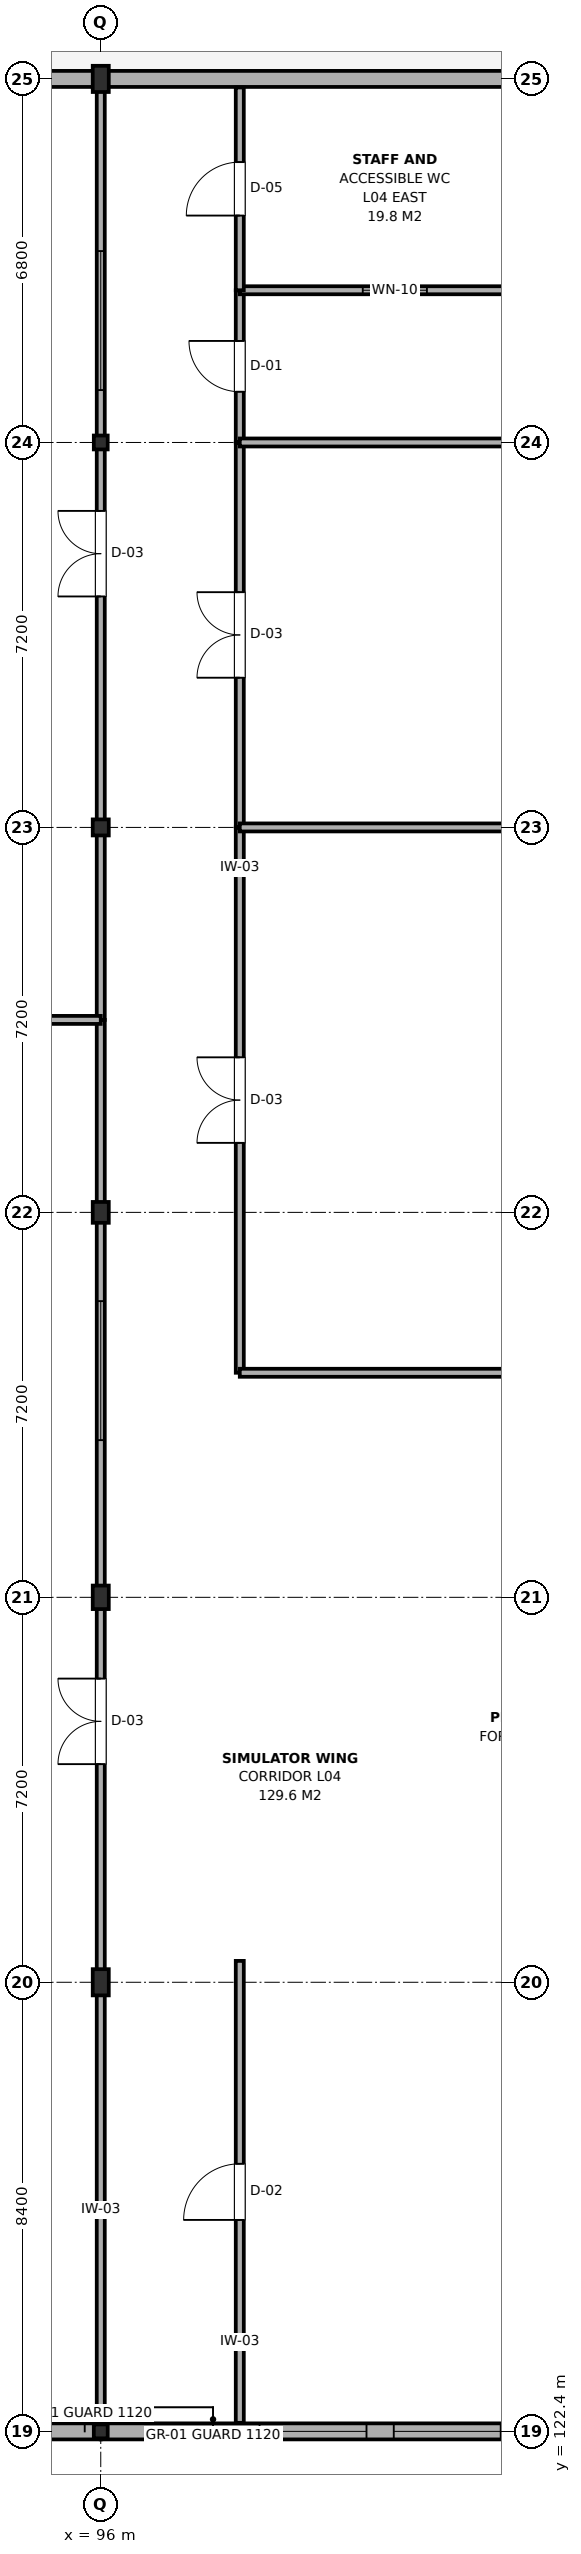
"""IFC4 building model, lengths in metres.
Left out: names, types, materials, properties, quantities, classifications, styles, units other than length and angle.
Written with IfcOpenShell. Run it as: python <this file> out.ifc"""

import sys

from ifc_helpers import new_model, si_unit, direction, frame, frame_2d, origin, origin_2d, place, context, subcontext, project, spatial, rectangle, i_section, extrude, element, fill, save


model = new_model("IFC4")
c1 = context("Model", 3, precision=1e-05, world=origin(), true_north=direction((0.0, 1.0)))
c2 = subcontext(c1, "Body", "Model", "MODEL_VIEW")
j1 = project(units=[si_unit("LENGTHUNIT", "METRE"), si_unit("PLANEANGLEUNIT", "RADIAN")], contexts=[c1])
p1 = place(None, origin())
s1 = spatial("IfcSite", under=j1, at=p1, CompositionType="ELEMENT")
p2 = place(p1, origin())
s2 = spatial("IfcBuilding", under=s1, at=p2, CompositionType="ELEMENT")
p3 = place(p2, frame((0.0, 0.0, 17.1)))
s3 = spatial("IfcBuildingStorey", under=s2, at=p3, CompositionType="ELEMENT", Elevation=17.1)
p4 = place(p3, frame((96.0, 122.4, 0.0), z_axis=(0.0, 0.0, 1.0), x_axis=(1.0, 0.0, 0.0)))
e1 = element("IfcColumn", 1, at=p4, inside=s3, PredefinedType="COLUMN", context=c2, shape_type="SweptSolid", body=[
    extrude(i_section(OverallWidth=0.26, OverallDepth=0.26, WebThickness=0.01, FlangeThickness=0.018, FilletRadius=0.024, at=origin_2d()), origin(), (0.0, 0.0, 1.0), 3.9),
])
p5 = place(p3, frame((96.0, 130.8, 0.0), z_axis=(0.0, 0.0, 1.0), x_axis=(1.0, 0.0, 0.0)))
e2 = element("IfcColumn", 2, at=p5, inside=s3, PredefinedType="COLUMN", context=c2, shape_type="SweptSolid", body=[
    extrude(i_section(OverallWidth=0.3, OverallDepth=0.49, WebThickness=0.012, FlangeThickness=0.023, FilletRadius=0.027, at=origin_2d()), origin(), (0.0, 0.0, 1.0), 3.9),
])
p6 = place(p3, frame((96.0, 138.0, 0.0), z_axis=(0.0, 0.0, 1.0), x_axis=(1.0, 0.0, 0.0)))
e3 = element("IfcColumn", 3, at=p6, inside=s3, PredefinedType="COLUMN", context=c2, shape_type="SweptSolid", body=[
    extrude(i_section(OverallWidth=0.3, OverallDepth=0.44, WebThickness=0.011, FlangeThickness=0.021, FilletRadius=0.027, at=origin_2d()), origin(), (0.0, 0.0, 1.0), 3.9),
])
p7 = place(p3, frame((96.0, 145.2, 0.0), z_axis=(0.0, 0.0, 1.0), x_axis=(1.0, 0.0, 0.0)))
e4 = element("IfcColumn", 4, at=p7, inside=s3, PredefinedType="COLUMN", context=c2, shape_type="SweptSolid", body=[
    extrude(i_section(OverallWidth=0.3, OverallDepth=0.39, WebThickness=0.011, FlangeThickness=0.019, FilletRadius=0.027, at=origin_2d()), origin(), (0.0, 0.0, 1.0), 3.9),
])
p8 = place(p3, frame((96.0, 152.4, 0.0), z_axis=(0.0, 0.0, 1.0), x_axis=(1.0, 0.0, 0.0)))
e5 = element("IfcColumn", 5, at=p8, inside=s3, PredefinedType="COLUMN", context=c2, shape_type="SweptSolid", body=[
    extrude(i_section(OverallWidth=0.3, OverallDepth=0.3, WebThickness=0.011, FlangeThickness=0.019, FilletRadius=0.027, at=origin_2d()), origin(), (0.0, 0.0, 1.0), 3.9),
])
p9 = place(p3, frame((96.0, 159.6, 0.0), z_axis=(0.0, 0.0, 1.0), x_axis=(1.0, 0.0, 0.0)))
e6 = element("IfcColumn", 6, at=p9, inside=s3, PredefinedType="COLUMN", context=c2, shape_type="SweptSolid", body=[
    extrude(i_section(OverallWidth=0.26, OverallDepth=0.26, WebThickness=0.01, FlangeThickness=0.018, FilletRadius=0.024, at=origin_2d()), origin(), (0.0, 0.0, 1.0), 3.9),
])
p10 = place(p3, frame((96.0, 166.4, 0.0), z_axis=(0.0, 0.0, 1.0), x_axis=(1.0, 0.0, 0.0)))
e7 = element("IfcColumn", 7, at=p10, inside=s3, PredefinedType="COLUMN", context=c2, shape_type="SweptSolid", body=[
    extrude(i_section(OverallWidth=0.3, OverallDepth=0.49, WebThickness=0.012, FlangeThickness=0.023, FilletRadius=0.027, at=origin_2d()), origin(), (0.0, 0.0, 1.0), 3.9),
])
p11 = place(p3, frame((87.0, 166.4, 0.0), z_axis=(0.0, 0.0, 1.0), x_axis=(1.0, 0.0, 0.0)))
e8 = element("IfcWall", 8, at=p11, inside=s3, PredefinedType="SOLIDWALL", context=c2, shape_type="SweptSolid", body=[
    extrude(rectangle(XDim=9.0, YDim=0.3, at=frame_2d((4.5, 0.0))), origin(), (0.0, 0.0, 1.0), 3.255),
])
p12 = place(p11, frame((1.52, 0.0, 0.65)))
e9 = element("IfcOpeningElement", 9, at=p12, cuts=e8, PredefinedType="OPENING", context=c2, shape_type="SweptSolid", body=[
    extrude(rectangle(XDim=2.0, YDim=1.8, at=frame_2d((1.0, 0.9))), frame((0.0, 0.165, 0.0), z_axis=(0.0, -1.0, 0.0), x_axis=(1.0, 0.0, 0.0)), (0.0, 0.0, 1.0), 0.33),
])
p13 = place(p11, frame((5.48, 0.0, 0.65)))
e10 = element("IfcOpeningElement", 10, at=p13, cuts=e8, PredefinedType="OPENING", context=c2, shape_type="SweptSolid", body=[
    extrude(rectangle(XDim=2.0, YDim=1.8, at=frame_2d((1.0, 0.9))), frame((0.0, 0.165, 0.0), z_axis=(0.0, -1.0, 0.0), x_axis=(1.0, 0.0, 0.0)), (0.0, 0.0, 1.0), 0.33),
])
p14 = place(p3, frame((96.0, 166.4, 0.0), z_axis=(0.0, 0.0, 1.0), x_axis=(1.0, 0.0, 0.0)))
e11 = element("IfcWall", 11, at=p14, inside=s3, PredefinedType="SOLIDWALL", context=c2, shape_type="SweptSolid", body=[
    extrude(rectangle(XDim=9.0, YDim=0.3, at=frame_2d((4.5, 0.0))), origin(), (0.0, 0.0, 1.0), 3.105),
])
p15 = place(p3, frame((87.0, 122.4, 0.0), z_axis=(0.0, 0.0, 1.0), x_axis=(1.0, 0.0, 0.0)))
e12 = element("IfcWall", 12, at=p15, inside=s3, PredefinedType="SOLIDWALL", context=c2, shape_type="SweptSolid", body=[
    extrude(rectangle(XDim=9.0, YDim=0.3, at=frame_2d((4.5, 0.0))), origin(), (0.0, 0.0, 1.0), 3.105),
])
p16 = place(p15, frame((1.52, 0.0, 0.65)))
e13 = element("IfcOpeningElement", 13, at=p16, cuts=e12, PredefinedType="OPENING", context=c2, shape_type="SweptSolid", body=[
    extrude(rectangle(XDim=2.0, YDim=1.8, at=frame_2d((1.0, 0.9))), frame((0.0, 0.165, 0.0), z_axis=(0.0, -1.0, 0.0), x_axis=(1.0, 0.0, 0.0)), (0.0, 0.0, 1.0), 0.33),
])
p17 = place(p15, frame((5.48, 0.0, 0.65)))
e14 = element("IfcOpeningElement", 14, at=p17, cuts=e12, PredefinedType="OPENING", context=c2, shape_type="SweptSolid", body=[
    extrude(rectangle(XDim=2.0, YDim=1.8, at=frame_2d((1.0, 0.9))), frame((0.0, 0.165, 0.0), z_axis=(0.0, -1.0, 0.0), x_axis=(1.0, 0.0, 0.0)), (0.0, 0.0, 1.0), 0.33),
])
p18 = place(p3, frame((96.0, 122.4, 0.0), z_axis=(0.0, 0.0, 1.0), x_axis=(1.0, 0.0, 0.0)))
e15 = element("IfcWall", 15, at=p18, inside=s3, PredefinedType="SOLIDWALL", context=c2, shape_type="SweptSolid", body=[
    extrude(rectangle(XDim=9.0, YDim=0.3, at=frame_2d((4.5, 0.0))), origin(), (0.0, 0.0, 1.0), 3.155),
])
p19 = place(p18, frame((2.97, 0.0, 0.65)))
e16 = element("IfcOpeningElement", 16, at=p19, cuts=e15, PredefinedType="OPENING", context=c2, shape_type="SweptSolid", body=[
    extrude(rectangle(XDim=2.0, YDim=1.8, at=frame_2d((1.0, 0.9))), frame((0.0, 0.165, 0.0), z_axis=(0.0, -1.0, 0.0), x_axis=(1.0, 0.0, 0.0)), (0.0, 0.0, 1.0), 0.33),
])
p20 = place(p18, frame((5.48, 0.0, 0.65)))
e17 = element("IfcOpeningElement", 17, at=p20, cuts=e15, PredefinedType="OPENING", context=c2, shape_type="SweptSolid", body=[
    extrude(rectangle(XDim=2.0, YDim=1.8, at=frame_2d((1.0, 0.9))), frame((0.0, 0.165, 0.0), z_axis=(0.0, -1.0, 0.0), x_axis=(1.0, 0.0, 0.0)), (0.0, 0.0, 1.0), 0.33),
])
p21 = place(p3, frame((96.0, 122.56, 0.0), z_axis=(0.0, 0.0, 1.0), x_axis=(0.0, 1.0, 0.0)))
e18 = element("IfcWall", 18, at=p21, inside=s3, PredefinedType="PARTITIONING", context=c2, shape_type="SweptSolid", body=[
    extrude(rectangle(XDim=26.24, YDim=0.15, at=frame_2d((13.12, 0.0))), origin(), (0.0, 0.0, 1.0), 3.095),
])
p22 = place(p21, frame((12.32, 0.0, 0.0)))
e19 = element("IfcOpeningElement", 19, at=p22, cuts=e18, PredefinedType="OPENING", context=c2, shape_type="SweptSolid", body=[
    extrude(rectangle(XDim=1.6, YDim=2.15, at=frame_2d((0.8, 1.075))), frame((0.0, 0.09, 0.0), z_axis=(0.0, -1.0, 0.0), x_axis=(1.0, 0.0, 0.0)), (0.0, 0.0, 1.0), 0.18),
])
p23 = place(p21, frame((18.38, 0.0, 0.95)))
e20 = element("IfcOpeningElement", 20, at=p23, cuts=e18, PredefinedType="OPENING", context=c2, shape_type="SweptSolid", body=[
    extrude(rectangle(XDim=2.6, YDim=1.5, at=frame_2d((1.3, 0.75))), frame((0.0, 0.09, 0.0), z_axis=(0.0, -1.0, 0.0), x_axis=(1.0, 0.0, 0.0)), (0.0, 0.0, 1.0), 0.18),
])
p24 = place(p3, frame((96.0, 148.8, 0.0), z_axis=(0.0, 0.0, 1.0), x_axis=(0.0, 1.0, 0.0)))
e21 = element("IfcWall", 21, at=p24, inside=s3, PredefinedType="PARTITIONING", context=c2, shape_type="SweptSolid", body=[
    extrude(rectangle(XDim=17.44, YDim=0.15, at=frame_2d((8.72, 0.0))), origin(), (0.0, 0.0, 1.0), 3.095),
])
p25 = place(p24, frame((7.92, 0.0, 0.0)))
e22 = element("IfcOpeningElement", 22, at=p25, cuts=e21, PredefinedType="OPENING", context=c2, shape_type="SweptSolid", body=[
    extrude(rectangle(XDim=1.6, YDim=2.15, at=frame_2d((0.8, 1.075))), frame((0.0, 0.09, 0.0), z_axis=(0.0, -1.0, 0.0), x_axis=(1.0, 0.0, 0.0)), (0.0, 0.0, 1.0), 0.18),
])
p26 = place(p24, frame((11.78, 0.0, 0.95)))
e23 = element("IfcOpeningElement", 23, at=p26, cuts=e21, PredefinedType="OPENING", context=c2, shape_type="SweptSolid", body=[
    extrude(rectangle(XDim=2.6, YDim=1.5, at=frame_2d((1.3, 0.75))), frame((0.0, 0.09, 0.0), z_axis=(0.0, -1.0, 0.0), x_axis=(1.0, 0.0, 0.0)), (0.0, 0.0, 1.0), 0.18),
])
p27 = place(p3, frame((78.14, 148.8, 0.0), z_axis=(0.0, 0.0, 1.0), x_axis=(1.0, 0.0, 0.0)))
e24 = element("IfcWall", 24, at=p27, inside=s3, PredefinedType="PARTITIONING", context=c2, shape_type="SweptSolid", body=[
    extrude(rectangle(XDim=17.86, YDim=0.15, at=frame_2d((8.93, 0.0))), origin(), (0.0, 0.0, 1.0), 3.095),
])
p28 = place(p27, frame((3.165, 0.0, 0.95)))
e25 = element("IfcOpeningElement", 25, at=p28, cuts=e24, PredefinedType="OPENING", context=c2, shape_type="SweptSolid", body=[
    extrude(rectangle(XDim=2.6, YDim=1.5, at=frame_2d((1.3, 0.75))), frame((0.0, 0.09, 0.0), z_axis=(0.0, -1.0, 0.0), x_axis=(1.0, 0.0, 0.0)), (0.0, 0.0, 1.0), 0.18),
])
p29 = place(p27, frame((12.095, 0.0, 0.95)))
e26 = element("IfcOpeningElement", 26, at=p29, cuts=e24, PredefinedType="OPENING", context=c2, shape_type="SweptSolid", body=[
    extrude(rectangle(XDim=2.6, YDim=1.5, at=frame_2d((1.3, 0.75))), frame((0.0, 0.09, 0.0), z_axis=(0.0, -1.0, 0.0), x_axis=(1.0, 0.0, 0.0)), (0.0, 0.0, 1.0), 0.18),
])
p30 = place(p3, frame((98.6, 122.56, 0.0), z_axis=(0.0, 0.0, 1.0), x_axis=(0.0, 1.0, 0.0)))
e27 = element("IfcWall", 27, at=p30, inside=s3, PredefinedType="PARTITIONING", context=c2, shape_type="SweptSolid", body=[
    extrude(rectangle(XDim=8.64, YDim=0.15, at=frame_2d((4.32, 0.0))), origin(), (0.0, 0.0, 1.0), 3.205),
])
p31 = place(p30, frame((3.795, 0.0, 0.0)))
e28 = element("IfcOpeningElement", 28, at=p31, cuts=e27, PredefinedType="OPENING", context=c2, shape_type="SweptSolid", body=[
    extrude(rectangle(XDim=1.05, YDim=2.15, at=frame_2d((0.525, 1.075))), frame((0.0, 0.09, 0.0), z_axis=(0.0, -1.0, 0.0), x_axis=(1.0, 0.0, 0.0)), (0.0, 0.0, 1.0), 0.18),
])
p32 = place(p3, frame((98.6, 142.2, 0.0), z_axis=(0.0, 0.0, 1.0), x_axis=(0.0, 1.0, 0.0)))
e29 = element("IfcWall", 29, at=p32, inside=s3, PredefinedType="PARTITIONING", context=c2, shape_type="SweptSolid", body=[
    extrude(rectangle(XDim=10.2, YDim=0.15, at=frame_2d((5.1, 0.0))), origin(), (0.0, 0.0, 1.0), 3.255),
])
p33 = place(p32, frame((4.3, 0.0, 0.0)))
e30 = element("IfcOpeningElement", 30, at=p33, cuts=e29, PredefinedType="OPENING", context=c2, shape_type="SweptSolid", body=[
    extrude(rectangle(XDim=1.6, YDim=2.15, at=frame_2d((0.8, 1.075))), frame((0.0, 0.09, 0.0), z_axis=(0.0, -1.0, 0.0), x_axis=(1.0, 0.0, 0.0)), (0.0, 0.0, 1.0), 0.18),
])
p34 = place(p3, frame((98.6, 142.2, 0.0), z_axis=(0.0, 0.0, 1.0), x_axis=(1.0, 0.0, 0.0)))
e31 = element("IfcWall", 31, at=p34, inside=s3, PredefinedType="PARTITIONING", context=c2, shape_type="SweptSolid", body=[
    extrude(rectangle(XDim=14.84, YDim=0.15, at=frame_2d((7.42, 0.0))), origin(), (0.0, 0.0, 1.0), 3.365),
])
p35 = place(p34, frame((6.12, 0.0, 0.95)))
e32 = element("IfcOpeningElement", 32, at=p35, cuts=e31, PredefinedType="OPENING", context=c2, shape_type="SweptSolid", body=[
    extrude(rectangle(XDim=2.6, YDim=1.5, at=frame_2d((1.3, 0.75))), frame((0.0, 0.09, 0.0), z_axis=(0.0, -1.0, 0.0), x_axis=(1.0, 0.0, 0.0)), (0.0, 0.0, 1.0), 0.18),
])
p36 = place(p3, frame((98.6, 152.4, 0.0), z_axis=(0.0, 0.0, 1.0), x_axis=(0.0, 1.0, 0.0)))
e33 = element("IfcWall", 33, at=p36, inside=s3, PredefinedType="PARTITIONING", context=c2, shape_type="SweptSolid", body=[
    extrude(rectangle(XDim=7.2, YDim=0.15, at=frame_2d((3.6, 0.0))), origin(), (0.0, 0.0, 1.0), 3.155),
])
p37 = place(p36, frame((2.8, 0.0, 0.0)))
e34 = element("IfcOpeningElement", 34, at=p37, cuts=e33, PredefinedType="OPENING", context=c2, shape_type="SweptSolid", body=[
    extrude(rectangle(XDim=1.6, YDim=2.15, at=frame_2d((0.8, 1.075))), frame((0.0, 0.09, 0.0), z_axis=(0.0, -1.0, 0.0), x_axis=(1.0, 0.0, 0.0)), (0.0, 0.0, 1.0), 0.18),
])
p38 = place(p3, frame((98.6, 152.4, 0.0), z_axis=(0.0, 0.0, 1.0), x_axis=(1.0, 0.0, 0.0)))
e35 = element("IfcWall", 35, at=p38, inside=s3, PredefinedType="PARTITIONING", context=c2, shape_type="SweptSolid", body=[
    extrude(rectangle(XDim=14.84, YDim=0.15, at=frame_2d((7.42, 0.0))), origin(), (0.0, 0.0, 1.0), 3.095),
])
p39 = place(p3, frame((98.6, 159.6, 0.0), z_axis=(0.0, 0.0, 1.0), x_axis=(0.0, 1.0, 0.0)))
e36 = element("IfcWall", 36, at=p39, inside=s3, PredefinedType="PARTITIONING", context=c2, shape_type="SweptSolid", body=[
    extrude(rectangle(XDim=2.847, YDim=0.15, at=frame_2d((1.423, 0.0))), origin(), (0.0, 0.0, 1.0), 3.155),
])
p40 = place(p39, frame((0.949, 0.0, 0.0)))
e37 = element("IfcOpeningElement", 37, at=p40, cuts=e36, PredefinedType="OPENING", context=c2, shape_type="SweptSolid", body=[
    extrude(rectangle(XDim=0.95, YDim=2.15, at=frame_2d((0.475, 1.075))), frame((0.0, 0.09, 0.0), z_axis=(0.0, -1.0, 0.0), x_axis=(1.0, 0.0, 0.0)), (0.0, 0.0, 1.0), 0.18),
])
p41 = place(p3, frame((98.6, 162.447, 0.0), z_axis=(0.0, 0.0, 1.0), x_axis=(1.0, 0.0, 0.0)))
e38 = element("IfcWall", 38, at=p41, inside=s3, PredefinedType="PARTITIONING", context=c2, shape_type="SweptSolid", body=[
    extrude(rectangle(XDim=5.8, YDim=0.15, at=frame_2d((2.9, 0.0))), origin(), (0.0, 0.0, 1.0), 3.695),
])
p42 = place(p41, frame((2.3, 0.0, 0.95)))
e39 = element("IfcOpeningElement", 39, at=p42, cuts=e38, PredefinedType="OPENING", context=c2, shape_type="SweptSolid", body=[
    extrude(rectangle(XDim=1.2, YDim=1.5, at=frame_2d((0.6, 0.75))), frame((0.0, 0.09, 0.0), z_axis=(0.0, -1.0, 0.0), x_axis=(1.0, 0.0, 0.0)), (0.0, 0.0, 1.0), 0.18),
])
p43 = place(p3, frame((98.6, 162.447, 0.0), z_axis=(0.0, 0.0, 1.0), x_axis=(0.0, 1.0, 0.0)))
e40 = element("IfcWall", 40, at=p43, inside=s3, PredefinedType="PARTITIONING", context=c2, shape_type="SweptSolid", body=[
    extrude(rectangle(XDim=3.793, YDim=0.15, at=frame_2d((1.896, 0.0))), origin(), (0.0, 0.0, 1.0), 3.345),
])
p44 = place(p43, frame((1.397, 0.0, 0.0)))
e41 = element("IfcOpeningElement", 41, at=p44, cuts=e40, PredefinedType="OPENING", context=c2, shape_type="SweptSolid", body=[
    extrude(rectangle(XDim=1.0, YDim=2.15, at=frame_2d((0.5, 1.075))), frame((0.0, 0.09, 0.0), z_axis=(0.0, -1.0, 0.0), x_axis=(1.0, 0.0, 0.0)), (0.0, 0.0, 1.0), 0.18),
])
p45 = place(p3, frame((98.6, 159.6, 0.0), z_axis=(0.0, 0.0, 1.0), x_axis=(1.0, 0.0, 0.0)))
e42 = element("IfcWall", 42, at=p45, inside=s3, PredefinedType="PARTITIONING", context=c2, shape_type="SweptSolid", body=[
    extrude(rectangle(XDim=14.84, YDim=0.15, at=frame_2d((7.42, 0.0))), origin(), (0.0, 0.0, 1.0), 3.145),
])
p46 = place(p19, origin())
e43 = element("IfcWindow", 43, at=p46, inside=s3, PartitioningType="SINGLE_PANEL", PredefinedType="WINDOW", context=c2, shape_type="SweptSolid", body=[
    extrude(rectangle(XDim=2.0, YDim=1.8, at=frame_2d((1.0, 0.9))), frame((0.0, 0.03, 0.0), z_axis=(0.0, -1.0, 0.0), x_axis=(1.0, 0.0, 0.0)), (0.0, 0.0, 1.0), 0.06),
])
fill(e16, e43)
p47 = place(p20, origin())
e44 = element("IfcWindow", 44, at=p47, inside=s3, PartitioningType="SINGLE_PANEL", PredefinedType="WINDOW", context=c2, shape_type="SweptSolid", body=[
    extrude(rectangle(XDim=2.0, YDim=1.8, at=frame_2d((1.0, 0.9))), frame((0.0, 0.03, 0.0), z_axis=(0.0, -1.0, 0.0), x_axis=(1.0, 0.0, 0.0)), (0.0, 0.0, 1.0), 0.06),
])
fill(e17, e44)
p48 = place(p22, origin())
e45 = element("IfcDoor", 45, at=p48, inside=s3, OperationType="DOUBLE_DOOR_SINGLE_SWING", PredefinedType="DOOR", context=c2, shape_type="SweptSolid", body=[
    extrude(rectangle(XDim=1.6, YDim=2.15, at=frame_2d((0.8, 1.075))), frame((0.0, 0.025, 0.0), z_axis=(0.0, -1.0, 0.0), x_axis=(1.0, 0.0, 0.0)), (0.0, 0.0, 1.0), 0.05),
])
fill(e19, e45)
p49 = place(p23, origin())
e46 = element("IfcWindow", 46, at=p49, inside=s3, PartitioningType="SINGLE_PANEL", PredefinedType="WINDOW", context=c2, shape_type="SweptSolid", body=[
    extrude(rectangle(XDim=2.6, YDim=1.5, at=frame_2d((1.3, 0.75))), frame((0.0, 0.03, 0.0), z_axis=(0.0, -1.0, 0.0), x_axis=(1.0, 0.0, 0.0)), (0.0, 0.0, 1.0), 0.06),
])
fill(e20, e46)
p50 = place(p25, origin())
e47 = element("IfcDoor", 47, at=p50, inside=s3, OperationType="DOUBLE_DOOR_SINGLE_SWING", PredefinedType="DOOR", context=c2, shape_type="SweptSolid", body=[
    extrude(rectangle(XDim=1.6, YDim=2.15, at=frame_2d((0.8, 1.075))), frame((0.0, 0.025, 0.0), z_axis=(0.0, -1.0, 0.0), x_axis=(1.0, 0.0, 0.0)), (0.0, 0.0, 1.0), 0.05),
])
fill(e22, e47)
p51 = place(p26, origin())
e48 = element("IfcWindow", 48, at=p51, inside=s3, PartitioningType="SINGLE_PANEL", PredefinedType="WINDOW", context=c2, shape_type="SweptSolid", body=[
    extrude(rectangle(XDim=2.6, YDim=1.5, at=frame_2d((1.3, 0.75))), frame((0.0, 0.03, 0.0), z_axis=(0.0, -1.0, 0.0), x_axis=(1.0, 0.0, 0.0)), (0.0, 0.0, 1.0), 0.06),
])
fill(e23, e48)
p52 = place(p31, origin())
e49 = element("IfcDoor", 49, at=p52, inside=s3, OperationType="SINGLE_SWING_LEFT", PredefinedType="DOOR", context=c2, shape_type="SweptSolid", body=[
    extrude(rectangle(XDim=1.05, YDim=2.15, at=frame_2d((0.525, 1.075))), frame((0.0, 0.025, 0.0), z_axis=(0.0, -1.0, 0.0), x_axis=(1.0, 0.0, 0.0)), (0.0, 0.0, 1.0), 0.05),
])
fill(e28, e49)
p53 = place(p33, origin())
e50 = element("IfcDoor", 50, at=p53, inside=s3, OperationType="DOUBLE_DOOR_SINGLE_SWING", PredefinedType="DOOR", context=c2, shape_type="SweptSolid", body=[
    extrude(rectangle(XDim=1.6, YDim=2.15, at=frame_2d((0.8, 1.075))), frame((0.0, 0.025, 0.0), z_axis=(0.0, -1.0, 0.0), x_axis=(1.0, 0.0, 0.0)), (0.0, 0.0, 1.0), 0.05),
])
fill(e30, e50)
p54 = place(p37, origin())
e51 = element("IfcDoor", 51, at=p54, inside=s3, OperationType="DOUBLE_DOOR_SINGLE_SWING", PredefinedType="DOOR", context=c2, shape_type="SweptSolid", body=[
    extrude(rectangle(XDim=1.6, YDim=2.15, at=frame_2d((0.8, 1.075))), frame((0.0, 0.025, 0.0), z_axis=(0.0, -1.0, 0.0), x_axis=(1.0, 0.0, 0.0)), (0.0, 0.0, 1.0), 0.05),
])
fill(e34, e51)
p55 = place(p40, origin())
e52 = element("IfcDoor", 52, at=p55, inside=s3, OperationType="SINGLE_SWING_RIGHT", PredefinedType="DOOR", context=c2, shape_type="SweptSolid", body=[
    extrude(rectangle(XDim=0.95, YDim=2.15, at=frame_2d((0.475, 1.075))), frame((0.0, 0.025, 0.0), z_axis=(0.0, -1.0, 0.0), x_axis=(1.0, 0.0, 0.0)), (0.0, 0.0, 1.0), 0.05),
])
fill(e37, e52)
p56 = place(p42, origin())
e53 = element("IfcWindow", 53, at=p56, inside=s3, PartitioningType="SINGLE_PANEL", PredefinedType="WINDOW", context=c2, shape_type="SweptSolid", body=[
    extrude(rectangle(XDim=1.2, YDim=1.5, at=frame_2d((0.6, 0.75))), frame((0.0, 0.03, 0.0), z_axis=(0.0, -1.0, 0.0), x_axis=(1.0, 0.0, 0.0)), (0.0, 0.0, 1.0), 0.06),
])
fill(e39, e53)
p57 = place(p44, origin())
e54 = element("IfcDoor", 54, at=p57, inside=s3, OperationType="SINGLE_SWING_LEFT", PredefinedType="DOOR", context=c2, shape_type="SweptSolid", body=[
    extrude(rectangle(XDim=1.0, YDim=2.15, at=frame_2d((0.5, 1.075))), frame((0.0, 0.025, 0.0), z_axis=(0.0, -1.0, 0.0), x_axis=(1.0, 0.0, 0.0)), (0.0, 0.0, 1.0), 0.05),
])
fill(e41, e54)
save(model, sys.argv[1])
